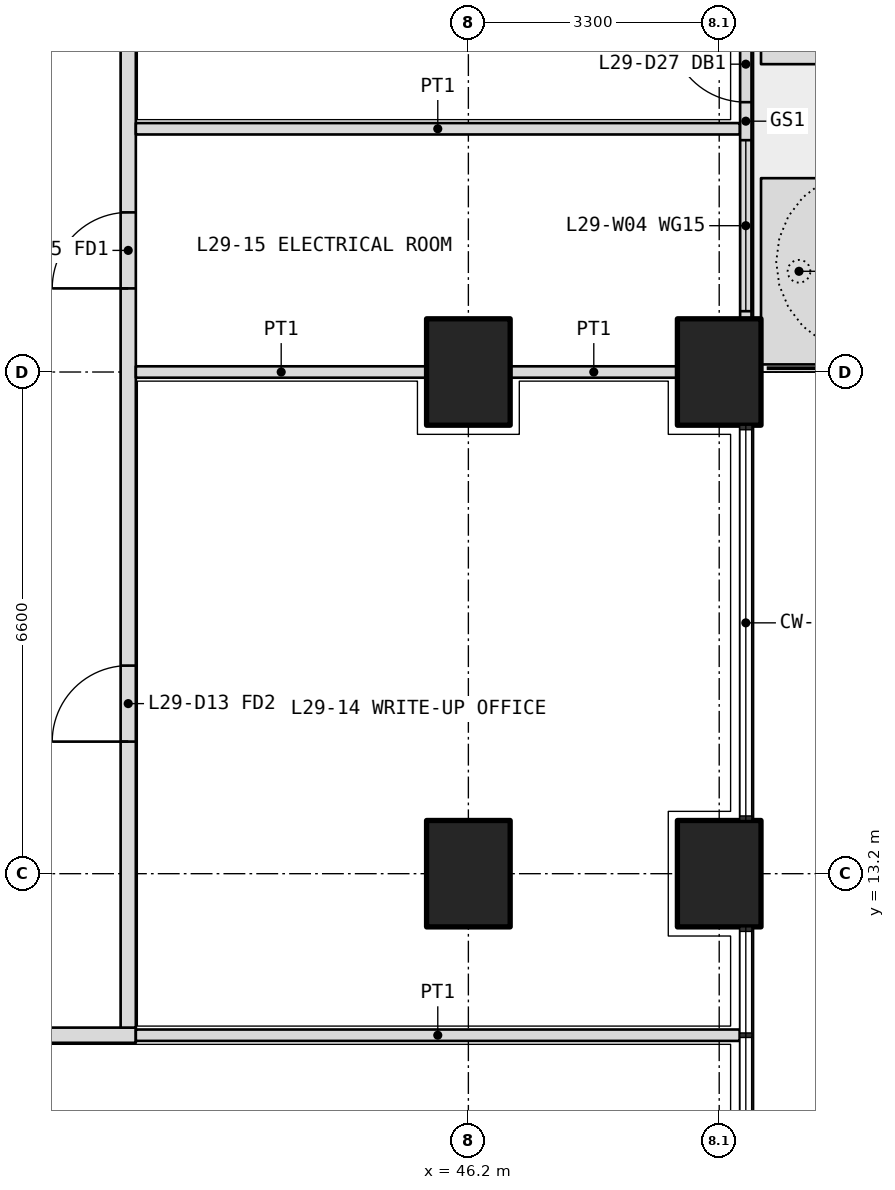
"""IFC4 building model, lengths in metres.
Left out: names, types, materials, properties, quantities, classifications, styles, units other than length and angle.
Written with IfcOpenShell. Run it as: python <this file> out.ifc"""

import sys

from ifc_helpers import new_model, si_unit, direction, frame, frame_2d, origin, origin_2d, place, context, subcontext, project, spatial, polyline, rectangle, outline, extrude, element, fill, save


model = new_model("IFC4")
c1 = context("Model", 3, precision=1e-05, world=origin(), true_north=direction((0.0, 1.0)))
c2 = subcontext(c1, "Body", "Model", "MODEL_VIEW")
j1 = project(units=[si_unit("LENGTHUNIT", "METRE"), si_unit("PLANEANGLEUNIT", "RADIAN")], contexts=[c1])
p1 = place(None, origin())
s1 = spatial("IfcSite", under=j1, at=p1, CompositionType="ELEMENT")
p2 = place(p1, origin())
s2 = spatial("IfcBuilding", under=s1, at=p2, CompositionType="ELEMENT")
p3 = place(p2, frame((0.0, 0.0, 128.4)))
s3 = spatial("IfcBuildingStorey", under=s2, at=p3, CompositionType="ELEMENT", Elevation=128.4)
for number, where, z_axis, x_axis in (
    (1, (49.5, 13.2, 0.0), (0.0, 0.0, 1.0), (0.0, 1.0, 0.0)),
    (2, (49.5, 19.8, 0.0), (0.0, 0.0, 1.0), (0.0, 1.0, 0.0)),
    (3, (46.2, 13.2, 0.0), (0.0, 0.0, 1.0), (0.0, 1.0, 0.0)),
    (4, (46.2, 19.8, 0.0), (0.0, 0.0, 1.0), (0.0, 1.0, 0.0)),
):
    element("IfcColumn", number, at=place(p3, frame(where, z_axis=z_axis, x_axis=x_axis)), inside=s3, PredefinedType="COLUMN", context=c2, shape_type="SweptSolid", body=[
        extrude(rectangle(XDim=1.4, YDim=1.1, at=origin_2d()), origin(), (0.0, 0.0, 1.0), 4.2),
    ])
p4 = place(p3, origin())
e5 = element("IfcWall", 5, at=p4, inside=s3, PredefinedType="USERDEFINED", context=c2, shape_type="SweptSolid", body=[
    extrude(outline(polyline([(50.05, 19.9), (51.05, 19.9), (51.05, 22.35), (50.05, 22.35), (50.05, 19.9)]), holes=[polyline([(50.2, 20.05), (50.9, 20.05), (50.9, 22.2), (50.2, 22.2), (50.2, 20.05)])]), origin(), (0.0, 0.0, 1.0), 1.05),
])
p5 = place(p3, origin())
e6 = element("IfcWall", 6, at=p5, inside=s3, PredefinedType="USERDEFINED", context=c2, shape_type="SweptSolid", body=[
    extrude(outline(polyline([(50.05, 23.85), (51.05, 23.85), (51.05, 32.9), (50.05, 32.9), (50.05, 23.85)]), holes=[polyline([(50.2, 24.0), (50.9, 24.0), (50.9, 32.75), (50.2, 32.75), (50.2, 24.0)])]), origin(), (0.0, 0.0, 1.0), 1.05),
])
p6 = place(p3, frame((49.85, 20.5, 0.0), z_axis=(0.0, 0.0, 1.0), x_axis=(0.0, 1.0, 0.0)))
e7 = element("IfcWall", 7, at=p6, inside=s3, PredefinedType="SOLIDWALL", context=c2, shape_type="SweptSolid", body=[
    extrude(rectangle(XDim=5.2, YDim=0.15, at=frame_2d((2.6, 0.0))), origin(), (0.0, 0.0, 1.0), 2.7),
])
p7 = place(p6, frame((2.85, 0.0, 0.0)))
e8 = element("IfcOpeningElement", 8, at=p7, cuts=e7, PredefinedType="OPENING", context=c2, shape_type="SweptSolid", body=[
    extrude(rectangle(XDim=1.0, YDim=2.4, at=frame_2d((0.5, 1.2))), frame((0.0, 0.085, 0.0), z_axis=(0.0, -1.0, 0.0), x_axis=(1.0, 0.0, 0.0)), (0.0, 0.0, 1.0), 0.17),
])
p8 = place(p6, frame((0.1, 0.0, 0.1)))
e9 = element("IfcOpeningElement", 9, at=p8, cuts=e7, PredefinedType="OPENING", context=c2, shape_type="SweptSolid", body=[
    extrude(rectangle(XDim=2.25, YDim=2.3, at=frame_2d((1.125, 1.15))), frame((0.0, 0.085, 0.0), z_axis=(0.0, -1.0, 0.0), x_axis=(1.0, 0.0, 0.0)), (0.0, 0.0, 1.0), 0.17),
])
p9 = place(p6, frame((3.95, 0.0, 0.1)))
e10 = element("IfcOpeningElement", 10, at=p9, cuts=e7, PredefinedType="OPENING", context=c2, shape_type="SweptSolid", body=[
    extrude(rectangle(XDim=1.15, YDim=2.3, at=frame_2d((0.575, 1.15))), frame((0.0, 0.085, 0.0), z_axis=(0.0, -1.0, 0.0), x_axis=(1.0, 0.0, 0.0)), (0.0, 0.0, 1.0), 0.17),
])
p10 = place(p3, frame((29.7, 11.075, 0.0), z_axis=(0.0, 0.0, 1.0), x_axis=(1.0, 0.0, 0.0)))
e11 = element("IfcWall", 11, at=p10, inside=s3, PredefinedType="PARTITIONING", context=c2, shape_type="SweptSolid", body=[
    extrude(rectangle(XDim=12.125, YDim=0.2, at=frame_2d((6.062, 0.0))), origin(), (0.0, 0.0, 1.0), 2.85),
])
p11 = place(p10, frame((1.6, 0.0, 0.0)))
e12 = element("IfcOpeningElement", 12, at=p11, cuts=e11, PredefinedType="OPENING", context=c2, shape_type="SweptSolid", body=[
    extrude(rectangle(XDim=1.0, YDim=2.1, at=frame_2d((0.5, 1.05))), frame((0.0, 0.11, 0.0), z_axis=(0.0, -1.0, 0.0), x_axis=(1.0, 0.0, 0.0)), (0.0, 0.0, 1.0), 0.22),
])
p12 = place(p10, frame((4.9, 0.0, 0.0)))
e13 = element("IfcOpeningElement", 13, at=p12, cuts=e11, PredefinedType="OPENING", context=c2, shape_type="SweptSolid", body=[
    extrude(rectangle(XDim=1.0, YDim=2.1, at=frame_2d((0.5, 1.05))), frame((0.0, 0.11, 0.0), z_axis=(0.0, -1.0, 0.0), x_axis=(1.0, 0.0, 0.0)), (0.0, 0.0, 1.0), 0.22),
])
p13 = place(p10, frame((8.812, 0.0, 0.0)))
e14 = element("IfcOpeningElement", 14, at=p13, cuts=e11, PredefinedType="OPENING", context=c2, shape_type="SweptSolid", body=[
    extrude(rectangle(XDim=1.0, YDim=2.1, at=frame_2d((0.5, 1.05))), frame((0.0, 0.11, 0.0), z_axis=(0.0, -1.0, 0.0), x_axis=(1.0, 0.0, 0.0)), (0.0, 0.0, 1.0), 0.22),
])
p14 = place(p3, frame((41.725, 11.175, 0.0), z_axis=(0.0, 0.0, 1.0), x_axis=(0.0, 1.0, 0.0)))
e15 = element("IfcWall", 15, at=p14, inside=s3, PredefinedType="PARTITIONING", context=c2, shape_type="SweptSolid", body=[
    extrude(rectangle(XDim=27.625, YDim=0.2, at=frame_2d((13.812, 0.0))), origin(), (0.0, 0.0, 1.0), 2.85),
])
p15 = place(p14, frame((3.762, 0.0, 0.0)))
e16 = element("IfcOpeningElement", 16, at=p15, cuts=e15, PredefinedType="OPENING", context=c2, shape_type="SweptSolid", body=[
    extrude(rectangle(XDim=1.0, YDim=2.1, at=frame_2d((0.5, 1.05))), frame((0.0, 0.11, 0.0), z_axis=(0.0, -1.0, 0.0), x_axis=(1.0, 0.0, 0.0)), (0.0, 0.0, 1.0), 0.22),
])
p16 = place(p14, frame((9.725, 0.0, 0.0)))
e17 = element("IfcOpeningElement", 17, at=p16, cuts=e15, PredefinedType="OPENING", context=c2, shape_type="SweptSolid", body=[
    extrude(rectangle(XDim=1.0, YDim=2.1, at=frame_2d((0.5, 1.05))), frame((0.0, 0.11, 0.0), z_axis=(0.0, -1.0, 0.0), x_axis=(1.0, 0.0, 0.0)), (0.0, 0.0, 1.0), 0.22),
])
p17 = place(p14, frame((13.075, 0.0, 0.0)))
e18 = element("IfcOpeningElement", 18, at=p17, cuts=e15, PredefinedType="OPENING", context=c2, shape_type="SweptSolid", body=[
    extrude(rectangle(XDim=0.9, YDim=2.1, at=frame_2d((0.45, 1.05))), frame((0.0, 0.11, 0.0), z_axis=(0.0, -1.0, 0.0), x_axis=(1.0, 0.0, 0.0)), (0.0, 0.0, 1.0), 0.22),
])
p18 = place(p14, frame((19.675, 0.0, 0.0)))
e19 = element("IfcOpeningElement", 19, at=p18, cuts=e15, PredefinedType="OPENING", context=c2, shape_type="SweptSolid", body=[
    extrude(rectangle(XDim=1.0, YDim=2.1, at=frame_2d((0.5, 1.05))), frame((0.0, 0.11, 0.0), z_axis=(0.0, -1.0, 0.0), x_axis=(1.0, 0.0, 0.0)), (0.0, 0.0, 1.0), 0.22),
])
p19 = place(p14, frame((25.925, 0.0, 0.0)))
e20 = element("IfcOpeningElement", 20, at=p19, cuts=e15, PredefinedType="OPENING", context=c2, shape_type="SweptSolid", body=[
    extrude(rectangle(XDim=1.0, YDim=2.1, at=frame_2d((0.5, 1.05))), frame((0.0, 0.11, 0.0), z_axis=(0.0, -1.0, 0.0), x_axis=(1.0, 0.0, 0.0)), (0.0, 0.0, 1.0), 0.22),
])
for number, where, z_axis, x_axis in (
    (21, (49.77, 11.075, 0.0), (0.0, 0.0, 1.0), (-1.0, 0.0, 0.0)),
    (22, (49.77, 23.0, 0.0), (0.0, 0.0, 1.0), (-1.0, 0.0, 0.0)),
):
    element("IfcWall", number, at=place(p3, frame(where, z_axis=z_axis, x_axis=x_axis)), inside=s3, PredefinedType="PARTITIONING", context=c2, shape_type="SweptSolid", body=[
        extrude(rectangle(XDim=7.945, YDim=0.15, at=frame_2d((3.973, 0.0))), origin(), (0.0, 0.0, 1.0), 2.7),
    ])
p20 = place(p3, frame((48.95, 19.8, 0.0), z_axis=(0.0, 0.0, 1.0), x_axis=(-1.0, 0.0, 0.0)))
e23 = element("IfcWall", 23, at=p20, inside=s3, PredefinedType="PARTITIONING", context=c2, shape_type="SweptSolid", body=[
    extrude(rectangle(XDim=2.2, YDim=0.15, at=frame_2d((1.1, 0.0))), origin(), (0.0, 0.0, 1.0), 2.85),
])
p21 = place(p3, frame((45.65, 19.8, 0.0), z_axis=(0.0, 0.0, 1.0), x_axis=(-1.0, 0.0, 0.0)))
e24 = element("IfcWall", 24, at=p21, inside=s3, PredefinedType="PARTITIONING", context=c2, shape_type="SweptSolid", body=[
    extrude(rectangle(XDim=3.825, YDim=0.15, at=frame_2d((1.913, 0.0))), origin(), (0.0, 0.0, 1.0), 2.85),
])
p22 = place(p7, origin())
e25 = element("IfcDoor", 25, at=p22, inside=s3, OperationType="SINGLE_SWING_RIGHT", PredefinedType="DOOR", context=c2, shape_type="SweptSolid", body=[
    extrude(rectangle(XDim=1.0, YDim=2.4, at=frame_2d((0.5, 1.2))), frame((0.0, 0.025, 0.0), z_axis=(0.0, -1.0, 0.0), x_axis=(1.0, 0.0, 0.0)), (0.0, 0.0, 1.0), 0.05),
])
fill(e8, e25)
p23 = place(p8, origin())
e26 = element("IfcWindow", 26, at=p23, inside=s3, PartitioningType="SINGLE_PANEL", PredefinedType="WINDOW", context=c2, shape_type="SweptSolid", body=[
    extrude(rectangle(XDim=2.25, YDim=2.3, at=frame_2d((1.125, 1.15))), frame((0.0, 0.03, 0.0), z_axis=(0.0, -1.0, 0.0), x_axis=(1.0, 0.0, 0.0)), (0.0, 0.0, 1.0), 0.06),
])
fill(e9, e26)
p24 = place(p15, origin())
e27 = element("IfcDoor", 27, at=p24, inside=s3, OperationType="SINGLE_SWING_LEFT", PredefinedType="DOOR", context=c2, shape_type="SweptSolid", body=[
    extrude(rectangle(XDim=1.0, YDim=2.1, at=frame_2d((0.5, 1.05))), frame((0.0, 0.025, 0.0), z_axis=(0.0, -1.0, 0.0), x_axis=(1.0, 0.0, 0.0)), (0.0, 0.0, 1.0), 0.05),
])
fill(e16, e27)
p25 = place(p16, origin())
e28 = element("IfcDoor", 28, at=p25, inside=s3, OperationType="SINGLE_SWING_LEFT", PredefinedType="DOOR", context=c2, shape_type="SweptSolid", body=[
    extrude(rectangle(XDim=1.0, YDim=2.1, at=frame_2d((0.5, 1.05))), frame((0.0, 0.025, 0.0), z_axis=(0.0, -1.0, 0.0), x_axis=(1.0, 0.0, 0.0)), (0.0, 0.0, 1.0), 0.05),
])
fill(e17, e28)
save(model, sys.argv[1])
